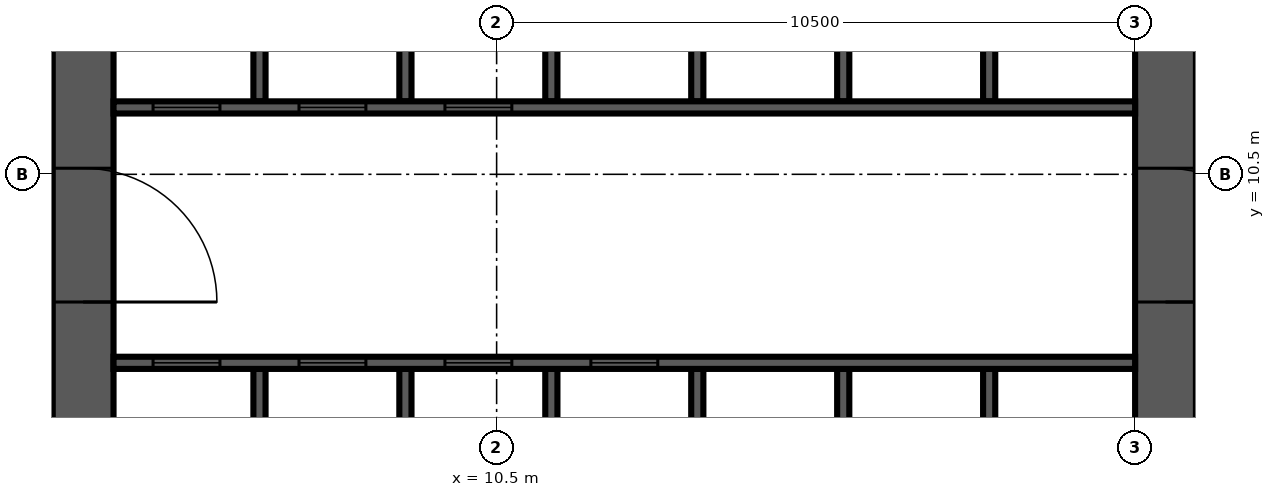
"""IFC4 building model, lengths in metres.
Left out: names, types, materials, properties, quantities, classifications, styles, units other than length and angle.
Written with IfcOpenShell. Run it as: python <this file> out.ifc"""

import sys

from ifc_helpers import new_model, si_unit, direction, frame, frame_2d, origin, place, context, subcontext, project, spatial, rectangle, extrude, source, transform, mapped, element, fill, save


model = new_model("IFC4")
c1 = context("Model", 3, precision=1e-05, world=origin(), true_north=direction((0.0, 1.0)))
c2 = subcontext(c1, "Body", "Model", "MODEL_VIEW")
j1 = project(units=[si_unit("LENGTHUNIT", "METRE"), si_unit("PLANEANGLEUNIT", "RADIAN")], contexts=[c1])
p1 = place(None, origin())
s1 = spatial("IfcSite", under=j1, at=p1, CompositionType="ELEMENT")
p2 = place(p1, origin())
s2 = spatial("IfcBuilding", under=s1, at=p2, CompositionType="ELEMENT")
p3 = place(p2, frame((0.0, 0.0, 132.9)))
s3 = spatial("IfcBuildingStorey", under=s2, at=p3, CompositionType="ELEMENT", Elevation=132.9)
m1 = source(origin(), c2, "Body", "SweptSolid", [
    extrude(rectangle(XDim=17.8, YDim=1.0, at=frame_2d((8.9, 0.0))), origin(), (0.0, 0.0, 1.0), 4.2),
])
p4 = place(p3, frame((3.7, 4.2, 0.0), z_axis=(0.0, 0.0, 1.0), x_axis=(0.0, 1.0, 0.0)))
e1 = element("IfcWall", 1, at=p4, inside=s3, PredefinedType="SHEAR", context=c2, shape_type="MappedRepresentation", body=[
    mapped(m1, transform((0.0, 0.0, 0.0), scale=1.0)),
])
m2 = source(origin(), c2, "Body", "SweptSolid", [
    extrude(rectangle(XDim=2.2, YDim=2.1, at=frame_2d((1.1, 1.05))), frame((0.0, 0.51, 0.0), z_axis=(0.0, -1.0, 0.0), x_axis=(1.0, 0.0, 0.0)), (0.0, 0.0, 1.0), 1.02),
])
p5 = place(p4, frame((4.2, 0.0, 0.0)))
e2 = element("IfcOpeningElement", 2, at=p5, cuts=e1, PredefinedType="OPENING", context=c2, shape_type="MappedRepresentation", body=[
    mapped(m2, transform((0.0, 0.0, 0.0), scale=1.0)),
])
m3 = source(origin(), c2, "Body", "SweptSolid", [
    extrude(rectangle(XDim=0.9, YDim=2.1, at=frame_2d((0.45, 1.05))), frame((0.0, 0.51, 0.0), z_axis=(0.0, -1.0, 0.0), x_axis=(1.0, 0.0, 0.0)), (0.0, 0.0, 1.0), 1.02),
])
p6 = place(p4, frame((10.95, 0.0, 0.0)))
e3 = element("IfcOpeningElement", 3, at=p6, cuts=e1, PredefinedType="OPENING", context=c2, shape_type="MappedRepresentation", body=[
    mapped(m3, transform((0.0, 0.0, 0.0), scale=1.0)),
])
m4 = source(origin(), c2, "Body", "SweptSolid", [
    extrude(rectangle(XDim=16.8, YDim=1.0, at=frame_2d((8.4, 0.0))), origin(), (0.0, 0.0, 1.0), 4.2),
])
p7 = place(p3, frame((21.5, 4.2, 0.0), z_axis=(0.0, 0.0, 1.0), x_axis=(0.0, 1.0, 0.0)))
e4 = element("IfcWall", 4, at=p7, inside=s3, PredefinedType="SHEAR", context=c2, shape_type="MappedRepresentation", body=[
    mapped(m4, transform((0.0, 0.0, 0.0), scale=1.0)),
])
p8 = place(p7, frame((4.2, 0.0, 0.0)))
e5 = element("IfcOpeningElement", 5, at=p8, cuts=e4, PredefinedType="OPENING", context=c2, shape_type="MappedRepresentation", body=[
    mapped(m2, transform((0.0, 0.0, 0.0), scale=1.0)),
])
m5 = source(origin(), c2, "Body", "SweptSolid", [
    extrude(rectangle(XDim=1.2, YDim=2.1, at=frame_2d((0.6, 1.05))), frame((0.0, 0.51, 0.0), z_axis=(0.0, -1.0, 0.0), x_axis=(1.0, 0.0, 0.0)), (0.0, 0.0, 1.0), 1.02),
])
p9 = place(p7, frame((14.7, 0.0, 0.0)))
e6 = element("IfcOpeningElement", 6, at=p9, cuts=e4, PredefinedType="OPENING", context=c2, shape_type="MappedRepresentation", body=[
    mapped(m5, transform((0.0, 0.0, 0.0), scale=1.0)),
])
m6 = source(origin(), c2, "Body", "SweptSolid", [
    extrude(rectangle(XDim=3.1, YDim=0.2, at=frame_2d((1.55, 0.0))), origin(), (0.0, 0.0, 1.0), 4.2),
])
for number, where, z_axis, x_axis in (
    (7, (6.6, 4.2, 0.0), (0.0, 0.0, 1.0), (0.0, 1.0, 0.0)),
    (8, (9.0, 4.2, 0.0), (0.0, 0.0, 1.0), (0.0, 1.0, 0.0)),
    (9, (11.4, 4.2, 0.0), (0.0, 0.0, 1.0), (0.0, 1.0, 0.0)),
    (10, (13.8, 4.2, 0.0), (0.0, 0.0, 1.0), (0.0, 1.0, 0.0)),
    (11, (16.2, 4.2, 0.0), (0.0, 0.0, 1.0), (0.0, 1.0, 0.0)),
    (12, (18.6, 4.2, 0.0), (0.0, 0.0, 1.0), (0.0, 1.0, 0.0)),
):
    element("IfcWall", number, at=place(p3, frame(where, z_axis=z_axis, x_axis=x_axis)), inside=s3, PredefinedType="SOLIDWALL", context=c2, shape_type="MappedRepresentation", body=[
        mapped(m6, transform((0.0, 0.0, 0.0), scale=1.0)),
    ])
m7 = source(origin(), c2, "Body", "SweptSolid", [
    extrude(rectangle(XDim=3.0, YDim=0.2, at=frame_2d((1.5, 0.0))), origin(), (0.0, 0.0, 1.0), 4.2),
])
for number, where, z_axis, x_axis in (
    (13, (6.6, 11.7, 0.0), (0.0, 0.0, 1.0), (0.0, 1.0, 0.0)),
    (14, (9.0, 11.7, 0.0), (0.0, 0.0, 1.0), (0.0, 1.0, 0.0)),
    (15, (11.4, 11.7, 0.0), (0.0, 0.0, 1.0), (0.0, 1.0, 0.0)),
    (16, (13.8, 11.7, 0.0), (0.0, 0.0, 1.0), (0.0, 1.0, 0.0)),
    (17, (16.2, 11.7, 0.0), (0.0, 0.0, 1.0), (0.0, 1.0, 0.0)),
    (18, (18.6, 11.7, 0.0), (0.0, 0.0, 1.0), (0.0, 1.0, 0.0)),
):
    element("IfcWall", number, at=place(p3, frame(where, z_axis=z_axis, x_axis=x_axis)), inside=s3, PredefinedType="SOLIDWALL", context=c2, shape_type="MappedRepresentation", body=[
        mapped(m7, transform((0.0, 0.0, 0.0), scale=1.0)),
    ])
m8 = source(origin(), c2, "Body", "SweptSolid", [
    extrude(rectangle(XDim=16.8, YDim=0.2, at=frame_2d((8.4, 0.0))), origin(), (0.0, 0.0, 1.0), 4.2),
])
p10 = place(p3, frame((4.2, 7.4, 0.0), z_axis=(0.0, 0.0, 1.0), x_axis=(1.0, 0.0, 0.0)))
e19 = element("IfcWall", 19, at=p10, inside=s3, PredefinedType="SOLIDWALL", context=c2, shape_type="MappedRepresentation", body=[
    mapped(m8, transform((0.0, 0.0, 0.0), scale=1.0)),
])
m9 = source(origin(), c2, "Body", "SweptSolid", [
    extrude(rectangle(XDim=1.1, YDim=2.1, at=frame_2d((0.55, 1.05))), frame((0.0, 0.11, 0.0), z_axis=(0.0, -1.0, 0.0), x_axis=(1.0, 0.0, 0.0)), (0.0, 0.0, 1.0), 0.22),
])
p11 = place(p10, frame((0.65, 0.0, 0.0)))
e20 = element("IfcOpeningElement", 20, at=p11, cuts=e19, PredefinedType="OPENING", context=c2, shape_type="MappedRepresentation", body=[
    mapped(m9, transform((0.0, 0.0, 0.0), scale=1.0)),
])
p12 = place(p10, frame((3.05, 0.0, 0.0)))
e21 = element("IfcOpeningElement", 21, at=p12, cuts=e19, PredefinedType="OPENING", context=c2, shape_type="MappedRepresentation", body=[
    mapped(m9, transform((0.0, 0.0, 0.0), scale=1.0)),
])
p13 = place(p10, frame((5.45, 0.0, 0.0)))
e22 = element("IfcOpeningElement", 22, at=p13, cuts=e19, PredefinedType="OPENING", context=c2, shape_type="MappedRepresentation", body=[
    mapped(m9, transform((0.0, 0.0, 0.0), scale=1.0)),
])
p14 = place(p10, frame((7.85, 0.0, 0.0)))
e23 = element("IfcOpeningElement", 23, at=p14, cuts=e19, PredefinedType="OPENING", context=c2, shape_type="MappedRepresentation", body=[
    mapped(m9, transform((0.0, 0.0, 0.0), scale=1.0)),
])
p15 = place(p3, frame((4.2, 11.6, 0.0), z_axis=(0.0, 0.0, 1.0), x_axis=(1.0, 0.0, 0.0)))
e24 = element("IfcWall", 24, at=p15, inside=s3, PredefinedType="SOLIDWALL", context=c2, shape_type="MappedRepresentation", body=[
    mapped(m8, transform((0.0, 0.0, 0.0), scale=1.0)),
])
p16 = place(p15, frame((0.65, 0.0, 0.0)))
e25 = element("IfcOpeningElement", 25, at=p16, cuts=e24, PredefinedType="OPENING", context=c2, shape_type="MappedRepresentation", body=[
    mapped(m9, transform((0.0, 0.0, 0.0), scale=1.0)),
])
p17 = place(p15, frame((3.05, 0.0, 0.0)))
e26 = element("IfcOpeningElement", 26, at=p17, cuts=e24, PredefinedType="OPENING", context=c2, shape_type="MappedRepresentation", body=[
    mapped(m9, transform((0.0, 0.0, 0.0), scale=1.0)),
])
p18 = place(p15, frame((5.45, 0.0, 0.0)))
e27 = element("IfcOpeningElement", 27, at=p18, cuts=e24, PredefinedType="OPENING", context=c2, shape_type="MappedRepresentation", body=[
    mapped(m9, transform((0.0, 0.0, 0.0), scale=1.0)),
])
m10 = source(origin(), c2, "Body", "SweptSolid", [
    extrude(rectangle(XDim=1.1, YDim=2.1, at=frame_2d((0.55, 1.05))), frame((0.0, 0.025, 0.0), z_axis=(0.0, -1.0, 0.0), x_axis=(1.0, 0.0, 0.0)), (0.0, 0.0, 1.0), 0.05),
])
p19 = place(p11, origin())
e28 = element("IfcDoor", 28, at=p19, inside=s3, OperationType="SLIDING_TO_LEFT", PredefinedType="DOOR", context=c2, shape_type="MappedRepresentation", body=[
    mapped(m10, transform((0.0, 0.0, 0.0), scale=1.0)),
])
fill(e20, e28)
p20 = place(p12, origin())
e29 = element("IfcDoor", 29, at=p20, inside=s3, OperationType="SLIDING_TO_LEFT", PredefinedType="DOOR", context=c2, shape_type="MappedRepresentation", body=[
    mapped(m10, transform((0.0, 0.0, 0.0), scale=1.0)),
])
fill(e21, e29)
p21 = place(p13, origin())
e30 = element("IfcDoor", 30, at=p21, inside=s3, OperationType="SLIDING_TO_LEFT", PredefinedType="DOOR", context=c2, shape_type="MappedRepresentation", body=[
    mapped(m10, transform((0.0, 0.0, 0.0), scale=1.0)),
])
fill(e22, e30)
p22 = place(p14, origin())
e31 = element("IfcDoor", 31, at=p22, inside=s3, OperationType="SLIDING_TO_LEFT", PredefinedType="DOOR", context=c2, shape_type="MappedRepresentation", body=[
    mapped(m10, transform((0.0, 0.0, 0.0), scale=1.0)),
])
fill(e23, e31)
p23 = place(p16, origin())
e32 = element("IfcDoor", 32, at=p23, inside=s3, OperationType="SLIDING_TO_LEFT", PredefinedType="DOOR", context=c2, shape_type="MappedRepresentation", body=[
    mapped(m10, transform((0.0, 0.0, 0.0), scale=1.0)),
])
fill(e25, e32)
p24 = place(p17, origin())
e33 = element("IfcDoor", 33, at=p24, inside=s3, OperationType="SLIDING_TO_LEFT", PredefinedType="DOOR", context=c2, shape_type="MappedRepresentation", body=[
    mapped(m10, transform((0.0, 0.0, 0.0), scale=1.0)),
])
fill(e26, e33)
p25 = place(p18, origin())
e34 = element("IfcDoor", 34, at=p25, inside=s3, OperationType="SLIDING_TO_LEFT", PredefinedType="DOOR", context=c2, shape_type="MappedRepresentation", body=[
    mapped(m10, transform((0.0, 0.0, 0.0), scale=1.0)),
])
fill(e27, e34)
m11 = source(origin(), c2, "Body", "SweptSolid", [
    extrude(rectangle(XDim=2.2, YDim=2.1, at=frame_2d((1.1, 1.05))), frame((0.0, 0.025, 0.0), z_axis=(0.0, -1.0, 0.0), x_axis=(1.0, 0.0, 0.0)), (0.0, 0.0, 1.0), 0.05),
])
p26 = place(p8, origin())
e35 = element("IfcDoor", 35, at=p26, inside=s3, OperationType="DOUBLE_DOOR_SINGLE_SWING", PredefinedType="DOOR", context=c2, shape_type="MappedRepresentation", body=[
    mapped(m11, transform((0.0, 0.0, 0.0), scale=1.0)),
])
fill(e5, e35)
p27 = place(p5, origin())
e36 = element("IfcDoor", 36, at=p27, inside=s3, OperationType="DOUBLE_DOOR_SINGLE_SWING", PredefinedType="DOOR", context=c2, shape_type="MappedRepresentation", body=[
    mapped(m11, transform((0.0, 0.0, 0.0), scale=1.0)),
])
fill(e2, e36)
save(model, sys.argv[1])
